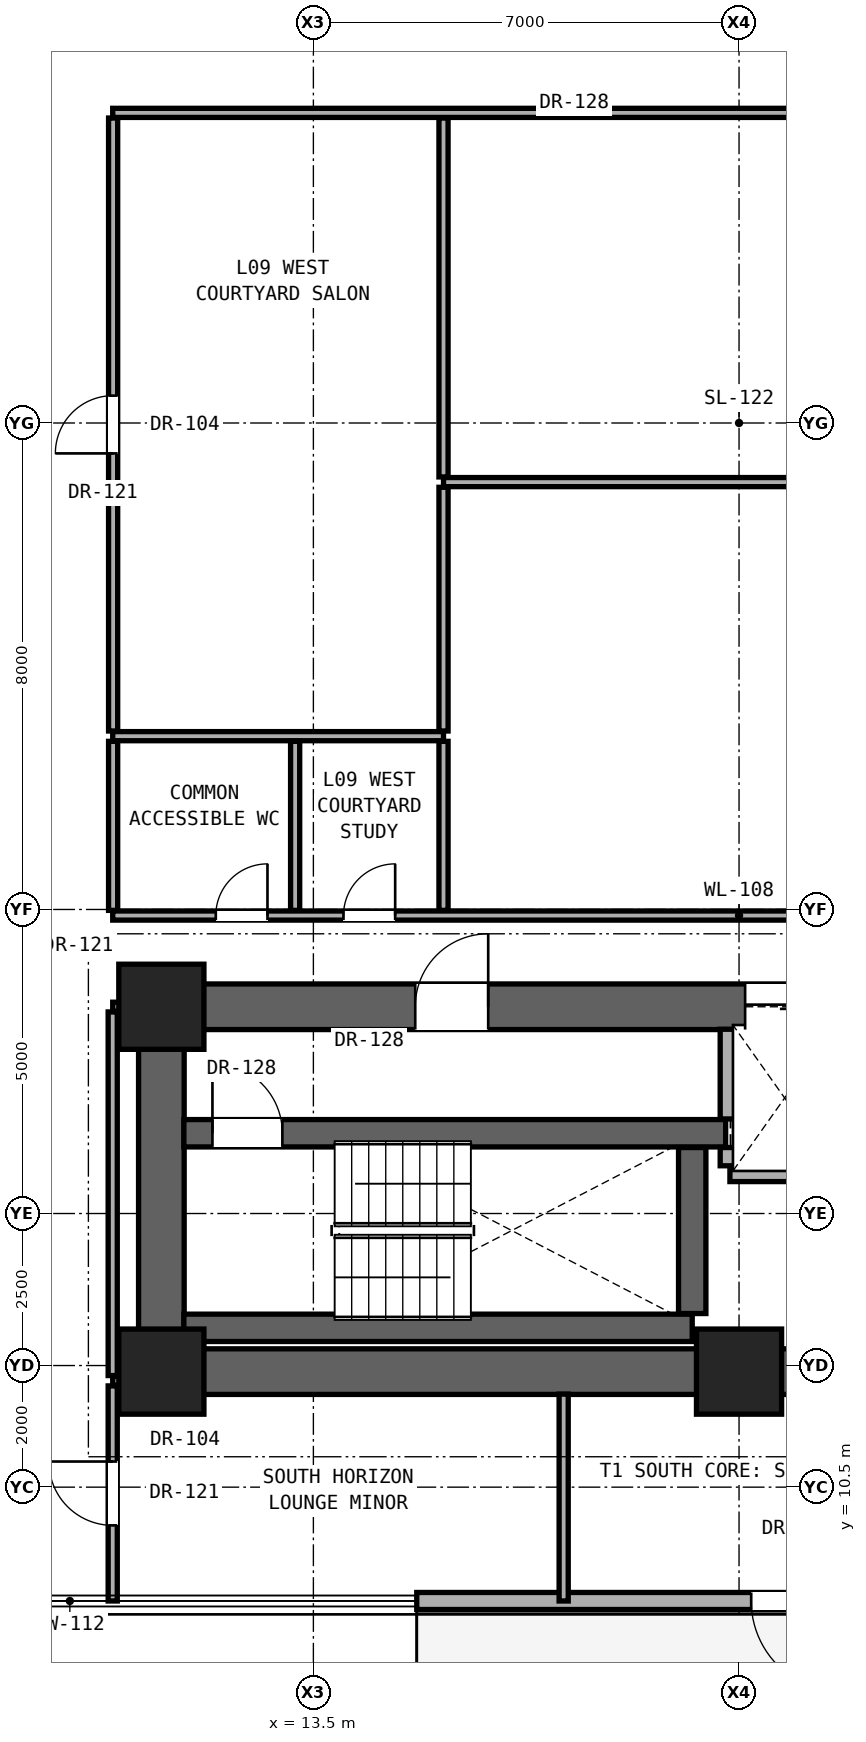
"""IFC4 building model, lengths in metres.
Left out: names, types, materials, properties, quantities, classifications, styles, units other than length and angle.
Written with IfcOpenShell. Run it as: python <this file> out.ifc"""

import sys

from ifc_helpers import new_model, si_unit, direction, frame, frame_2d, origin, origin_2d, place, context, subcontext, project, spatial, rectangle, extrude, element, fill, save


model = new_model("IFC4")
c1 = context("Model", 3, precision=1e-05, world=origin(), true_north=direction((0.0, 1.0)))
c2 = subcontext(c1, "Body", "Model", "MODEL_VIEW")
j1 = project(units=[si_unit("LENGTHUNIT", "METRE"), si_unit("PLANEANGLEUNIT", "RADIAN")], contexts=[c1])
p1 = place(None, origin())
s1 = spatial("IfcSite", under=j1, at=p1, CompositionType="ELEMENT")
p2 = place(p1, origin())
s2 = spatial("IfcBuilding", under=s1, at=p2, CompositionType="ELEMENT")
p3 = place(p2, frame((0.0, 0.0, 35.6)))
s3 = spatial("IfcBuildingStorey", under=s2, at=p3, CompositionType="ELEMENT", Elevation=35.6)
for number, where, z_axis, x_axis in (
    (1, (11.0, 12.4, 0.0), (0.0, 0.0, 1.0), (1.0, 0.0, 0.0)),
    (2, (20.5, 12.4, 0.0), (0.0, 0.0, 1.0), (1.0, 0.0, 0.0)),
    (3, (11.0, 18.4, 0.0), (0.0, 0.0, 1.0), (1.0, 0.0, 0.0)),
):
    element("IfcColumn", number, at=place(p3, frame(where, z_axis=z_axis, x_axis=x_axis)), inside=s3, PredefinedType="COLUMN", context=c2, shape_type="SweptSolid", body=[
        extrude(rectangle(XDim=1.4, YDim=1.4, at=origin_2d()), origin(), (0.0, 0.0, 1.0), 3.3),
    ])
p4 = place(p3, frame((11.0, 12.4, 0.0), z_axis=(0.0, 0.0, 1.0), x_axis=(1.0, 0.0, 0.0)))
e4 = element("IfcWall", 4, at=p4, inside=s3, PredefinedType="SHEAR", context=c2, shape_type="SweptSolid", body=[
    extrude(rectangle(XDim=19.0, YDim=0.75, at=frame_2d((9.5, 0.0))), origin(), (0.0, 0.0, 1.0), 3.06),
])
p5 = place(p3, frame((11.0, 12.4, 0.0), z_axis=(0.0, 0.0, 1.0), x_axis=(0.0, 1.0, 0.0)))
e5 = element("IfcWall", 5, at=p5, inside=s3, PredefinedType="SHEAR", context=c2, shape_type="SweptSolid", body=[
    extrude(rectangle(XDim=6.0, YDim=0.75, at=frame_2d((3.0, 0.0))), origin(), (0.0, 0.0, 1.0), 3.06),
])
p6 = place(p3, frame((11.0, 18.4, 0.0), z_axis=(0.0, 0.0, 1.0), x_axis=(1.0, 0.0, 0.0)))
e6 = element("IfcWall", 6, at=p6, inside=s3, PredefinedType="SHEAR", context=c2, shape_type="SweptSolid", body=[
    extrude(rectangle(XDim=19.0, YDim=0.75, at=frame_2d((9.5, 0.0))), origin(), (0.0, 0.0, 1.0), 3.06),
])
p7 = place(p6, frame((4.175, 0.0, 0.0)))
e7 = element("IfcOpeningElement", 7, at=p7, cuts=e6, PredefinedType="OPENING", context=c2, shape_type="SweptSolid", body=[
    extrude(rectangle(XDim=1.2, YDim=2.25, at=frame_2d((0.6, 1.125))), frame((0.0, 0.385, 0.0), z_axis=(0.0, -1.0, 0.0), x_axis=(1.0, 0.0, 0.0)), (0.0, 0.0, 1.0), 0.77),
])
p8 = place(p6, frame((9.6, 0.0, 0.0)))
e8 = element("IfcOpeningElement", 8, at=p8, cuts=e6, PredefinedType="OPENING", context=c2, shape_type="SweptSolid", body=[
    extrude(rectangle(XDim=1.3, YDim=2.3, at=frame_2d((0.65, 1.15))), frame((0.0, 0.385, 0.0), z_axis=(0.0, -1.0, 0.0), x_axis=(1.0, 0.0, 0.0)), (0.0, 0.0, 1.0), 0.77),
])
p9 = place(p6, frame((11.9, 0.0, 0.0)))
e9 = element("IfcOpeningElement", 9, at=p9, cuts=e6, PredefinedType="OPENING", context=c2, shape_type="SweptSolid", body=[
    extrude(rectangle(XDim=1.3, YDim=2.3, at=frame_2d((0.65, 1.15))), frame((0.0, 0.385, 0.0), z_axis=(0.0, -1.0, 0.0), x_axis=(1.0, 0.0, 0.0)), (0.0, 0.0, 1.0), 0.77),
])
p10 = place(p6, frame((14.3, 0.0, 0.0)))
e10 = element("IfcOpeningElement", 10, at=p10, cuts=e6, PredefinedType="OPENING", context=c2, shape_type="SweptSolid", body=[
    extrude(rectangle(XDim=1.3, YDim=2.3, at=frame_2d((0.65, 1.15))), frame((0.0, 0.385, 0.0), z_axis=(0.0, -1.0, 0.0), x_axis=(1.0, 0.0, 0.0)), (0.0, 0.0, 1.0), 0.77),
])
p11 = place(p6, frame((16.6, 0.0, 0.0)))
e11 = element("IfcOpeningElement", 11, at=p11, cuts=e6, PredefinedType="OPENING", context=c2, shape_type="SweptSolid", body=[
    extrude(rectangle(XDim=1.3, YDim=2.3, at=frame_2d((0.65, 1.15))), frame((0.0, 0.385, 0.0), z_axis=(0.0, -1.0, 0.0), x_axis=(1.0, 0.0, 0.0)), (0.0, 0.0, 1.0), 0.77),
])
p12 = place(p3, frame((25.8, 8.628, 0.0), z_axis=(0.0, 0.0, 1.0), x_axis=(-1.0, 0.0, 0.0)))
e12 = element("IfcWall", 12, at=p12, inside=s3, PredefinedType="SOLIDWALL", context=c2, shape_type="SweptSolid", body=[
    extrude(rectangle(XDim=10.6, YDim=0.28, at=frame_2d((5.3, 0.0))), origin(), (0.0, 0.0, 1.0), 3.02),
])
p13 = place(p12, frame((0.55, 0.0, 0.67)))
e13 = element("IfcOpeningElement", 13, at=p13, cuts=e12, PredefinedType="OPENING", context=c2, shape_type="SweptSolid", body=[
    extrude(rectangle(XDim=1.65, YDim=2.2, at=frame_2d((0.825, 1.1))), frame((0.0, 0.15, 0.0), z_axis=(0.0, -1.0, 0.0), x_axis=(1.0, 0.0, 0.0)), (0.0, 0.0, 1.0), 0.3),
])
p14 = place(p12, frame((3.6, 0.0, 0.0)))
e14 = element("IfcOpeningElement", 14, at=p14, cuts=e12, PredefinedType="OPENING", context=c2, shape_type="SweptSolid", body=[
    extrude(rectangle(XDim=1.5, YDim=2.3, at=frame_2d((0.75, 1.15))), frame((0.0, 0.15, 0.0), z_axis=(0.0, -1.0, 0.0), x_axis=(1.0, 0.0, 0.0)), (0.0, 0.0, 1.0), 0.3),
])
p15 = place(p3, frame((10.2, 12.25, 0.0), z_axis=(0.0, 0.0, 1.0), x_axis=(1.0, 0.0, 0.0)))
e15 = element("IfcWall", 15, at=p15, inside=s3, PredefinedType="PARTITIONING", context=c2, shape_type="SweptSolid", body=[
    extrude(rectangle(XDim=0.43, YDim=0.15, at=frame_2d((0.215, 0.0))), origin(), (0.0, 0.0, 1.0), 3.06),
])
p16 = place(p3, frame((11.37, 13.12, 0.0), z_axis=(0.0, 0.0, 1.0), x_axis=(1.0, 0.0, 0.0)))
e16 = element("IfcWall", 16, at=p16, inside=s3, PredefinedType="SHEAR", context=c2, shape_type="SweptSolid", body=[
    extrude(rectangle(XDim=8.36, YDim=0.45, at=frame_2d((4.18, 0.0))), origin(), (0.0, 0.0, 1.0), 3.06),
])
p17 = place(p3, frame((20.35, 15.65, 0.0), z_axis=(0.0, 0.0, 1.0), x_axis=(1.0, 0.0, 0.0)))
e17 = element("IfcWall", 17, at=p17, inside=s3, PredefinedType="SOLIDWALL", context=c2, shape_type="SweptSolid", body=[
    extrude(rectangle(XDim=4.15, YDim=0.25, at=frame_2d((2.075, 0.0))), origin(), (0.0, 0.0, 1.0), 3.06),
])
p18 = place(p3, frame((11.37, 16.32, 0.0), z_axis=(0.0, 0.0, 1.0), x_axis=(1.0, 0.0, 0.0)))
e18 = element("IfcWall", 18, at=p18, inside=s3, PredefinedType="SHEAR", context=c2, shape_type="SweptSolid", body=[
    extrude(rectangle(XDim=8.91, YDim=0.45, at=frame_2d((4.455, 0.0))), origin(), (0.0, 0.0, 1.0), 3.06),
])
p19 = place(p18, frame((0.47, 0.0, 0.0)))
e19 = element("IfcOpeningElement", 19, at=p19, cuts=e18, PredefinedType="OPENING", context=c2, shape_type="SweptSolid", body=[
    extrude(rectangle(XDim=1.15, YDim=2.2, at=frame_2d((0.575, 1.1))), frame((0.0, 0.235, 0.0), z_axis=(0.0, -1.0, 0.0), x_axis=(1.0, 0.0, 0.0)), (0.0, 0.0, 1.0), 0.47),
])
p20 = place(p3, frame((10.2, 18.4, 0.0), z_axis=(0.0, 0.0, 1.0), x_axis=(1.0, 0.0, 0.0)))
e20 = element("IfcWall", 20, at=p20, inside=s3, PredefinedType="PARTITIONING", context=c2, shape_type="SweptSolid", body=[
    extrude(rectangle(XDim=0.43, YDim=0.15, at=frame_2d((0.215, 0.0))), origin(), (0.0, 0.0, 1.0), 2.436),
])
p21 = place(p3, frame((10.2, 19.9, 0.0), z_axis=(0.0, 0.0, 1.0), x_axis=(1.0, 0.0, 0.0)))
e21 = element("IfcWall", 21, at=p21, inside=s3, PredefinedType="PARTITIONING", context=c2, shape_type="SweptSolid", body=[
    extrude(rectangle(XDim=20.6, YDim=0.15, at=frame_2d((10.3, 0.0))), origin(), (0.0, 0.0, 1.0), 2.104),
])
p22 = place(p21, frame((1.695, 0.0, 0.0)))
e22 = element("IfcOpeningElement", 22, at=p22, cuts=e21, PredefinedType="OPENING", context=c2, shape_type="SweptSolid", body=[
    extrude(rectangle(XDim=0.85, YDim=2.01, at=frame_2d((0.425, 1.005))), frame((0.0, 0.085, 0.0), z_axis=(0.0, -1.0, 0.0), x_axis=(1.0, 0.0, 0.0)), (0.0, 0.0, 1.0), 0.17),
])
p23 = place(p21, frame((3.795, 0.0, 0.0)))
e23 = element("IfcOpeningElement", 23, at=p23, cuts=e21, PredefinedType="OPENING", context=c2, shape_type="SweptSolid", body=[
    extrude(rectangle(XDim=0.85, YDim=2.01, at=frame_2d((0.425, 1.005))), frame((0.0, 0.085, 0.0), z_axis=(0.0, -1.0, 0.0), x_axis=(1.0, 0.0, 0.0)), (0.0, 0.0, 1.0), 0.17),
])
p24 = place(p21, frame((12.575, 0.0, 0.0)))
e24 = element("IfcOpeningElement", 24, at=p24, cuts=e21, PredefinedType="OPENING", context=c2, shape_type="SweptSolid", body=[
    extrude(rectangle(XDim=0.85, YDim=2.01, at=frame_2d((0.425, 1.005))), frame((0.0, 0.085, 0.0), z_axis=(0.0, -1.0, 0.0), x_axis=(1.0, 0.0, 0.0)), (0.0, 0.0, 1.0), 0.17),
])
p25 = place(p3, frame((10.2, 22.85, 0.0), z_axis=(0.0, 0.0, 1.0), x_axis=(1.0, 0.0, 0.0)))
e25 = element("IfcWall", 25, at=p25, inside=s3, PredefinedType="PARTITIONING", context=c2, shape_type="SweptSolid", body=[
    extrude(rectangle(XDim=5.44, YDim=0.15, at=frame_2d((2.72, 0.0))), origin(), (0.0, 0.0, 1.0), 2.104),
])
p26 = place(p3, frame((15.64, 27.028, 0.0), z_axis=(0.0, 0.0, 1.0), x_axis=(1.0, 0.0, 0.0)))
e26 = element("IfcWall", 26, at=p26, inside=s3, PredefinedType="PARTITIONING", context=c2, shape_type="SweptSolid", body=[
    extrude(rectangle(XDim=15.16, YDim=0.15, at=frame_2d((7.58, 0.0))), origin(), (0.0, 0.0, 1.0), 2.104),
])
p27 = place(p3, frame((10.2, 33.1, 0.0), z_axis=(0.0, 0.0, 1.0), x_axis=(1.0, 0.0, 0.0)))
e27 = element("IfcWall", 27, at=p27, inside=s3, PredefinedType="PARTITIONING", context=c2, shape_type="SweptSolid", body=[
    extrude(rectangle(XDim=20.6, YDim=0.15, at=frame_2d((10.3, 0.0))), origin(), (0.0, 0.0, 1.0), 2.104),
])
p28 = place(p27, frame((12.575, 0.0, 0.0)))
e28 = element("IfcOpeningElement", 28, at=p28, cuts=e27, PredefinedType="OPENING", context=c2, shape_type="SweptSolid", body=[
    extrude(rectangle(XDim=0.85, YDim=2.01, at=frame_2d((0.425, 1.005))), frame((0.0, 0.085, 0.0), z_axis=(0.0, -1.0, 0.0), x_axis=(1.0, 0.0, 0.0)), (0.0, 0.0, 1.0), 0.17),
])
p29 = place(p3, frame((10.2, 8.628, 0.0), z_axis=(0.0, 0.0, 1.0), x_axis=(0.0, 1.0, 0.0)))
e29 = element("IfcWall", 29, at=p29, inside=s3, PredefinedType="PARTITIONING", context=c2, shape_type="SweptSolid", body=[
    extrude(rectangle(XDim=3.537, YDim=0.15, at=frame_2d((1.769, 0.0))), origin(), (0.0, 0.0, 1.0), 3.06),
])
p30 = place(p29, frame((1.243, 0.0, 0.0)))
e30 = element("IfcOpeningElement", 30, at=p30, cuts=e29, PredefinedType="OPENING", context=c2, shape_type="SweptSolid", body=[
    extrude(rectangle(XDim=1.05, YDim=2.2, at=frame_2d((0.525, 1.1))), frame((0.0, 0.085, 0.0), z_axis=(0.0, -1.0, 0.0), x_axis=(1.0, 0.0, 0.0)), (0.0, 0.0, 1.0), 0.17),
])
p31 = place(p3, frame((10.2, 12.335, 0.0), z_axis=(0.0, 0.0, 1.0), x_axis=(0.0, 1.0, 0.0)))
e31 = element("IfcWall", 31, at=p31, inside=s3, PredefinedType="PARTITIONING", context=c2, shape_type="SweptSolid", body=[
    extrude(rectangle(XDim=5.98, YDim=0.15, at=frame_2d((2.99, 0.0))), origin(), (0.0, 0.0, 1.0), 2.436),
])
p32 = place(p3, frame((10.207, 19.985, 0.0), z_axis=(0.0, 0.0, 1.0), x_axis=(0.0, 1.0, 0.0)))
e32 = element("IfcWall", 32, at=p32, inside=s3, PredefinedType="PARTITIONING", context=c2, shape_type="SweptSolid", body=[
    extrude(rectangle(XDim=2.78, YDim=0.15, at=frame_2d((1.39, 0.0))), origin(), (0.0, 0.0, 1.0), 3.06),
])
p33 = place(p3, frame((10.207, 22.935, 0.0), z_axis=(0.0, 0.0, 1.0), x_axis=(0.0, 1.0, 0.0)))
e33 = element("IfcWall", 33, at=p33, inside=s3, PredefinedType="PARTITIONING", context=c2, shape_type="SweptSolid", body=[
    extrude(rectangle(XDim=10.08, YDim=0.15, at=frame_2d((5.04, 0.0))), origin(), (0.0, 0.0, 1.0), 2.279),
])
p34 = place(p33, frame((4.565, 0.0, 0.0)))
e34 = element("IfcOpeningElement", 34, at=p34, cuts=e33, PredefinedType="OPENING", context=c2, shape_type="SweptSolid", body=[
    extrude(rectangle(XDim=0.95, YDim=2.15, at=frame_2d((0.475, 1.075))), frame((0.0, 0.085, 0.0), z_axis=(0.0, -1.0, 0.0), x_axis=(1.0, 0.0, 0.0)), (0.0, 0.0, 1.0), 0.17),
])
p35 = place(p3, frame((13.2, 19.985, 0.0), z_axis=(0.0, 0.0, 1.0), x_axis=(0.0, 1.0, 0.0)))
e35 = element("IfcWall", 35, at=p35, inside=s3, PredefinedType="PARTITIONING", context=c2, shape_type="SweptSolid", body=[
    extrude(rectangle(XDim=2.78, YDim=0.15, at=frame_2d((1.39, 0.0))), origin(), (0.0, 0.0, 1.0), 3.06),
])
p36 = place(p3, frame((15.64, 19.985, 0.0), z_axis=(0.0, 0.0, 1.0), x_axis=(0.0, 1.0, 0.0)))
e36 = element("IfcWall", 36, at=p36, inside=s3, PredefinedType="PARTITIONING", context=c2, shape_type="SweptSolid", body=[
    extrude(rectangle(XDim=2.78, YDim=0.15, at=frame_2d((1.39, 0.0))), origin(), (0.0, 0.0, 1.0), 2.589),
])
p37 = place(p3, frame((15.64, 22.935, 0.0), z_axis=(0.0, 0.0, 1.0), x_axis=(0.0, 1.0, 0.0)))
e37 = element("IfcWall", 37, at=p37, inside=s3, PredefinedType="PARTITIONING", context=c2, shape_type="SweptSolid", body=[
    extrude(rectangle(XDim=4.008, YDim=0.15, at=frame_2d((2.004, 0.0))), origin(), (0.0, 0.0, 1.0), 2.104),
])
p38 = place(p3, frame((15.64, 27.113, 0.0), z_axis=(0.0, 0.0, 1.0), x_axis=(0.0, 1.0, 0.0)))
e38 = element("IfcWall", 38, at=p38, inside=s3, PredefinedType="PARTITIONING", context=c2, shape_type="SweptSolid", body=[
    extrude(rectangle(XDim=5.902, YDim=0.15, at=frame_2d((2.951, 0.0))), origin(), (0.0, 0.0, 1.0), 2.104),
])
p39 = place(p3, frame((17.616, 8.628, 0.0), z_axis=(0.0, 0.0, 1.0), x_axis=(0.0, 1.0, 0.0)))
e39 = element("IfcWall", 39, at=p39, inside=s3, PredefinedType="PARTITIONING", context=c2, shape_type="SweptSolid", body=[
    extrude(rectangle(XDim=3.402, YDim=0.15, at=frame_2d((1.701, 0.0))), origin(), (0.0, 0.0, 1.0), 3.06),
])
p40 = place(p3, frame((19.73, 13.355, 0.0), z_axis=(0.0, 0.0, 1.0), x_axis=(0.0, 1.0, 0.0)))
e40 = element("IfcWall", 40, at=p40, inside=s3, PredefinedType="SHEAR", context=c2, shape_type="SweptSolid", body=[
    extrude(rectangle(XDim=2.73, YDim=0.45, at=frame_2d((1.365, 0.0))), origin(), (0.0, 0.0, 1.0), 3.06),
])
p41 = place(p3, frame((20.315, 15.785, 0.0), z_axis=(0.0, 0.0, 1.0), x_axis=(0.0, 1.0, 0.0)))
e41 = element("IfcWall", 41, at=p41, inside=s3, PredefinedType="SOLIDWALL", context=c2, shape_type="SweptSolid", body=[
    extrude(rectangle(XDim=0.3, YDim=0.25, at=frame_2d((0.15, 0.0))), origin(), (0.0, 0.0, 1.0), 3.06),
])
p42 = place(p3, frame((20.315, 16.555, 0.0), z_axis=(0.0, 0.0, 1.0), x_axis=(0.0, 1.0, 0.0)))
e42 = element("IfcWall", 42, at=p42, inside=s3, PredefinedType="SOLIDWALL", context=c2, shape_type="SweptSolid", body=[
    extrude(rectangle(XDim=1.475, YDim=0.25, at=frame_2d((0.738, 0.0))), origin(), (0.0, 0.0, 1.0), 3.06),
])
p43 = place(p14, origin())
e43 = element("IfcDoor", 43, at=p43, inside=s3, OperationType="SINGLE_SWING_LEFT", PredefinedType="DOOR", context=c2, shape_type="SweptSolid", body=[
    extrude(rectangle(XDim=1.5, YDim=2.3, at=frame_2d((0.75, 1.15))), frame((0.0, 0.025, 0.0), z_axis=(0.0, -1.0, 0.0), x_axis=(1.0, 0.0, 0.0)), (0.0, 0.0, 1.0), 0.05),
])
fill(e14, e43)
p44 = place(p7, origin())
e44 = element("IfcDoor", 44, at=p44, inside=s3, OperationType="SINGLE_SWING_RIGHT", PredefinedType="DOOR", context=c2, shape_type="SweptSolid", body=[
    extrude(rectangle(XDim=1.2, YDim=2.25, at=frame_2d((0.6, 1.125))), frame((0.0, 0.025, 0.0), z_axis=(0.0, -1.0, 0.0), x_axis=(1.0, 0.0, 0.0)), (0.0, 0.0, 1.0), 0.05),
])
fill(e7, e44)
p45 = place(p19, origin())
e45 = element("IfcDoor", 45, at=p45, inside=s3, OperationType="SINGLE_SWING_LEFT", PredefinedType="DOOR", context=c2, shape_type="SweptSolid", body=[
    extrude(rectangle(XDim=1.15, YDim=2.2, at=frame_2d((0.575, 1.1))), frame((0.0, 0.025, 0.0), z_axis=(0.0, -1.0, 0.0), x_axis=(1.0, 0.0, 0.0)), (0.0, 0.0, 1.0), 0.05),
])
fill(e19, e45)
p46 = place(p22, origin())
e46 = element("IfcDoor", 46, at=p46, inside=s3, OperationType="SINGLE_SWING_RIGHT", PredefinedType="DOOR", context=c2, shape_type="SweptSolid", body=[
    extrude(rectangle(XDim=0.85, YDim=2.01, at=frame_2d((0.425, 1.005))), frame((0.0, 0.025, 0.0), z_axis=(0.0, -1.0, 0.0), x_axis=(1.0, 0.0, 0.0)), (0.0, 0.0, 1.0), 0.05),
])
fill(e22, e46)
p47 = place(p23, origin())
e47 = element("IfcDoor", 47, at=p47, inside=s3, OperationType="SINGLE_SWING_RIGHT", PredefinedType="DOOR", context=c2, shape_type="SweptSolid", body=[
    extrude(rectangle(XDim=0.85, YDim=2.01, at=frame_2d((0.425, 1.005))), frame((0.0, 0.025, 0.0), z_axis=(0.0, -1.0, 0.0), x_axis=(1.0, 0.0, 0.0)), (0.0, 0.0, 1.0), 0.05),
])
fill(e23, e47)
p48 = place(p34, origin())
e48 = element("IfcDoor", 48, at=p48, inside=s3, OperationType="SINGLE_SWING_LEFT", PredefinedType="DOOR", context=c2, shape_type="SweptSolid", body=[
    extrude(rectangle(XDim=0.95, YDim=2.15, at=frame_2d((0.475, 1.075))), frame((0.0, 0.025, 0.0), z_axis=(0.0, -1.0, 0.0), x_axis=(1.0, 0.0, 0.0)), (0.0, 0.0, 1.0), 0.05),
])
fill(e34, e48)
p49 = place(p30, origin())
e49 = element("IfcDoor", 49, at=p49, inside=s3, OperationType="SINGLE_SWING_RIGHT", PredefinedType="DOOR", context=c2, shape_type="SweptSolid", body=[
    extrude(rectangle(XDim=1.05, YDim=2.2, at=frame_2d((0.525, 1.1))), frame((0.0, 0.025, 0.0), z_axis=(0.0, -1.0, 0.0), x_axis=(1.0, 0.0, 0.0)), (0.0, 0.0, 1.0), 0.05),
])
fill(e30, e49)
p50 = place(p8, origin())
e50 = element("IfcDoor", 50, at=p50, inside=s3, OperationType="DOUBLE_DOOR_SLIDING", PredefinedType="DOOR", context=c2, shape_type="SweptSolid", body=[
    extrude(rectangle(XDim=1.3, YDim=2.3, at=frame_2d((0.65, 1.15))), frame((0.0, 0.025, 0.0), z_axis=(0.0, -1.0, 0.0), x_axis=(1.0, 0.0, 0.0)), (0.0, 0.0, 1.0), 0.05),
])
fill(e8, e50)
save(model, sys.argv[1])
